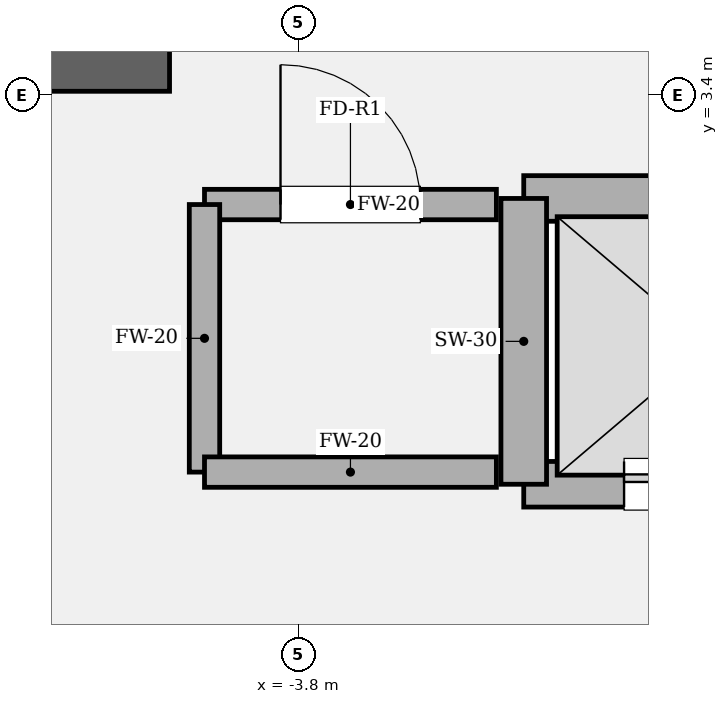
"""IFC4 building model, lengths in metres.
Left out: names, types, materials, properties, quantities, classifications, styles, units other than length and angle.
Written with IfcOpenShell. Run it as: python <this file> out.ifc"""

import sys

from ifc_helpers import new_model, si_unit, direction, frame, frame_2d, origin, place, context, subcontext, project, spatial, rectangle, extrude, element, fill, save


model = new_model("IFC4")
c1 = context("Model", 3, precision=1e-05, world=origin(), true_north=direction((0.0, 1.0)))
c2 = subcontext(c1, "Body", "Model", "MODEL_VIEW")
j1 = project(units=[si_unit("LENGTHUNIT", "METRE"), si_unit("PLANEANGLEUNIT", "RADIAN")], contexts=[c1])
p1 = place(None, origin())
s1 = spatial("IfcSite", under=j1, at=p1, CompositionType="ELEMENT")
p2 = place(p1, origin())
s2 = spatial("IfcBuilding", under=s1, at=p2, CompositionType="ELEMENT")
p3 = place(p2, frame((0.0, 0.0, 288.0)))
s3 = spatial("IfcBuildingStorey", under=s2, at=p3, CompositionType="ELEMENT", Elevation=288.0)
p4 = place(p3, frame((-9.925, 3.6, 0.0), z_axis=(0.0, 0.0, 1.0), x_axis=(1.0, 0.0, 0.0)))
e1 = element("IfcWall", 1, at=p4, inside=s3, PredefinedType="SOLIDWALL", context=c2, shape_type="SweptSolid", body=[
    extrude(rectangle(XDim=5.275, YDim=0.35, at=frame_2d((2.638, 0.0))), origin(), (0.0, 0.0, 1.0), 4.2),
])
p5 = place(p3, frame((-2.32, 0.84, 0.0), z_axis=(0.0, 0.0, 1.0), x_axis=(1.0, 0.0, 0.0)))
e2 = element("IfcWall", 2, at=p5, inside=s3, PredefinedType="SOLIDWALL", context=c2, shape_type="SweptSolid", body=[
    extrude(rectangle(XDim=4.64, YDim=0.3, at=frame_2d((2.32, 0.0))), origin(), (0.0, 0.0, 1.0), 4.0),
])
p6 = place(p5, frame((0.66, 0.0, 0.0)))
e3 = element("IfcOpeningElement", 3, at=p6, cuts=e2, PredefinedType="OPENING", context=c2, shape_type="SweptSolid", body=[
    extrude(rectangle(XDim=1.12, YDim=2.25, at=frame_2d((0.56, 1.125))), frame((0.0, 0.16, 0.0), z_axis=(0.0, -1.0, 0.0), x_axis=(1.0, 0.0, 0.0)), (0.0, 0.0, 1.0), 0.32),
])
p7 = place(p5, frame((2.86, 0.0, 0.0)))
e4 = element("IfcOpeningElement", 4, at=p7, cuts=e2, PredefinedType="OPENING", context=c2, shape_type="SweptSolid", body=[
    extrude(rectangle(XDim=1.12, YDim=2.25, at=frame_2d((0.56, 1.125))), frame((0.0, 0.16, 0.0), z_axis=(0.0, -1.0, 0.0), x_axis=(1.0, 0.0, 0.0)), (0.0, 0.0, 1.0), 0.32),
])
p8 = place(p3, frame((-2.32, 2.72, 0.0), z_axis=(0.0, 0.0, 1.0), x_axis=(1.0, 0.0, 0.0)))
e5 = element("IfcWall", 5, at=p8, inside=s3, PredefinedType="SOLIDWALL", context=c2, shape_type="SweptSolid", body=[
    extrude(rectangle(XDim=4.64, YDim=0.3, at=frame_2d((2.32, 0.0))), origin(), (0.0, 0.0, 1.0), 4.0),
])
p9 = place(p3, frame((-2.32, 0.84, 0.0), z_axis=(0.0, 0.0, 1.0), x_axis=(0.0, 1.0, 0.0)))
e6 = element("IfcWall", 6, at=p9, inside=s3, PredefinedType="SOLIDWALL", context=c2, shape_type="SweptSolid", body=[
    extrude(rectangle(XDim=1.88, YDim=0.3, at=frame_2d((0.94, 0.0))), origin(), (0.0, 0.0, 1.0), 4.0),
])
p10 = place(p3, frame((-2.5, 2.68, 0.0), z_axis=(0.0, 0.0, 1.0), x_axis=(-1.0, 0.0, 0.0)))
e7 = element("IfcWall", 7, at=p10, inside=s3, PredefinedType="SOLIDWALL", context=c2, shape_type="SweptSolid", body=[
    extrude(rectangle(XDim=1.92, YDim=0.2, at=frame_2d((0.96, 0.0))), origin(), (0.0, 0.0, 1.0), 4.0),
])
p11 = place(p10, frame((0.5, 0.0, 0.0)))
e8 = element("IfcOpeningElement", 8, at=p11, cuts=e7, PredefinedType="OPENING", context=c2, shape_type="SweptSolid", body=[
    extrude(rectangle(XDim=0.92, YDim=2.1, at=frame_2d((0.46, 1.05))), frame((0.0, 0.11, 0.0), z_axis=(0.0, -1.0, 0.0), x_axis=(1.0, 0.0, 0.0)), (0.0, 0.0, 1.0), 0.22),
])
p12 = place(p3, frame((-4.42, 2.68, 0.0), z_axis=(0.0, 0.0, 1.0), x_axis=(0.0, -1.0, 0.0)))
e9 = element("IfcWall", 9, at=p12, inside=s3, PredefinedType="SOLIDWALL", context=c2, shape_type="SweptSolid", body=[
    extrude(rectangle(XDim=1.76, YDim=0.2, at=frame_2d((0.88, 0.0))), origin(), (0.0, 0.0, 1.0), 4.0),
])
p13 = place(p3, frame((-4.42, 0.92, 0.0), z_axis=(0.0, 0.0, 1.0), x_axis=(1.0, 0.0, 0.0)))
e10 = element("IfcWall", 10, at=p13, inside=s3, PredefinedType="SOLIDWALL", context=c2, shape_type="SweptSolid", body=[
    extrude(rectangle(XDim=1.92, YDim=0.2, at=frame_2d((0.96, 0.0))), origin(), (0.0, 0.0, 1.0), 4.0),
])
p14 = place(p6, origin())
e11 = element("IfcDoor", 11, at=p14, inside=s3, OperationType="DOUBLE_DOOR_SLIDING", PredefinedType="DOOR", context=c2, shape_type="SweptSolid", body=[
    extrude(rectangle(XDim=1.12, YDim=2.25, at=frame_2d((0.56, 1.125))), frame((0.0, 0.025, 0.0), z_axis=(0.0, -1.0, 0.0), x_axis=(1.0, 0.0, 0.0)), (0.0, 0.0, 1.0), 0.05),
])
fill(e3, e11)
p15 = place(p11, origin())
e12 = element("IfcDoor", 12, at=p15, inside=s3, OperationType="SINGLE_SWING_RIGHT", PredefinedType="DOOR", context=c2, shape_type="SweptSolid", body=[
    extrude(rectangle(XDim=0.92, YDim=2.1, at=frame_2d((0.46, 1.05))), frame((0.0, 0.025, 0.0), z_axis=(0.0, -1.0, 0.0), x_axis=(1.0, 0.0, 0.0)), (0.0, 0.0, 1.0), 0.05),
])
fill(e8, e12)
save(model, sys.argv[1])
